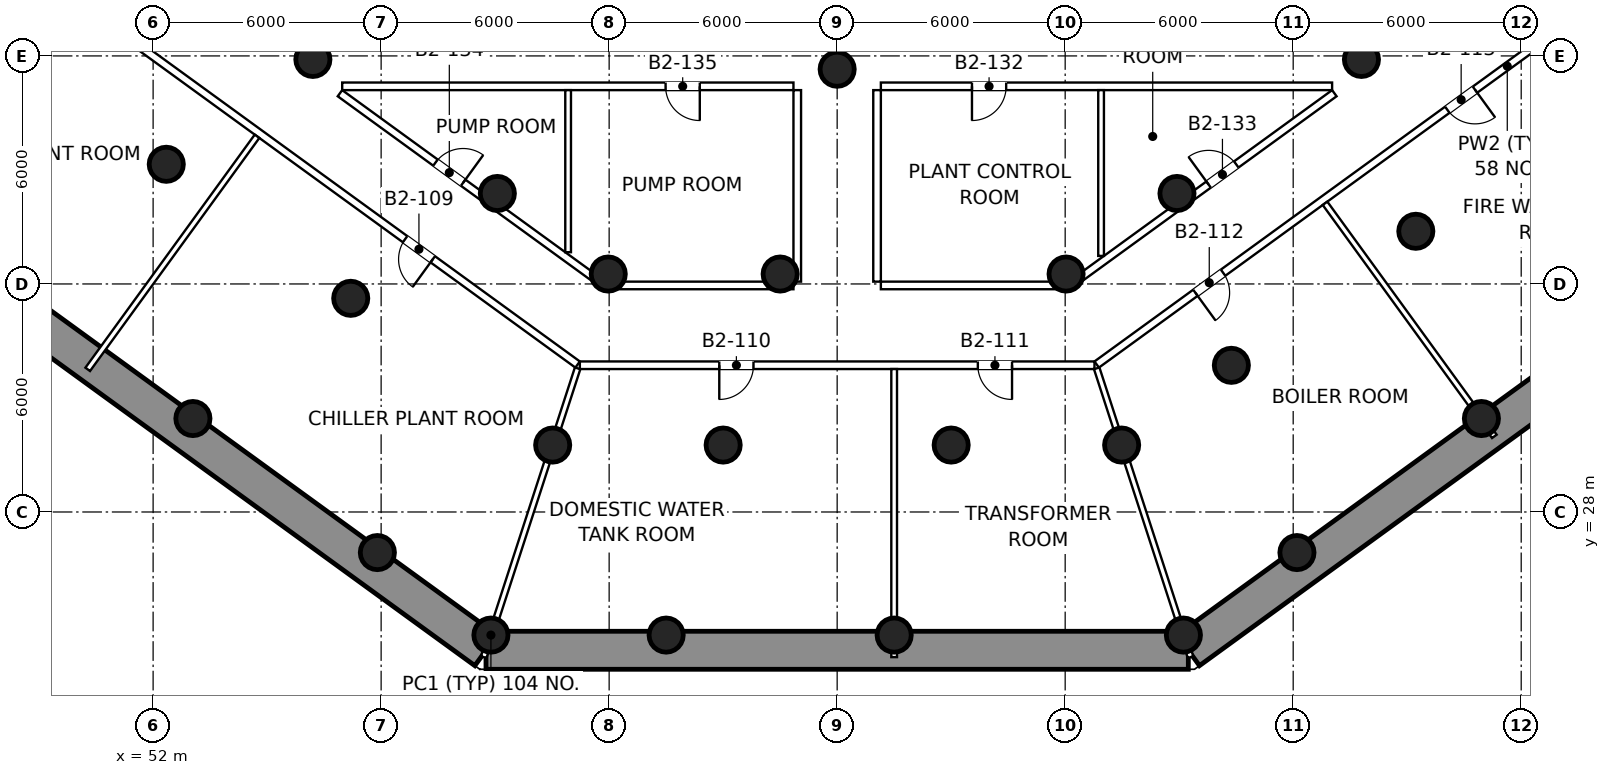
"""IFC4 building model, lengths in metres.
Left out: names, types, materials, properties, quantities, classifications, styles, units other than length and angle.
Written with IfcOpenShell. Run it as: python <this file> out.ifc"""

import sys

from ifc_helpers import new_model, si_unit, direction, frame, frame_2d, origin, origin_2d, place, context, subcontext, project, spatial, rectangle, circle, extrude, element, fill, save


model = new_model("IFC4")
c1 = context("Model", 3, precision=1e-05, world=origin(), true_north=direction((0.0, 1.0)))
c2 = subcontext(c1, "Body", "Model", "MODEL_VIEW")
j1 = project(units=[si_unit("LENGTHUNIT", "METRE"), si_unit("PLANEANGLEUNIT", "RADIAN")], contexts=[c1])
p1 = place(None, origin())
s1 = spatial("IfcSite", under=j1, at=p1, CompositionType="ELEMENT")
p2 = place(p1, origin())
s2 = spatial("IfcBuilding", under=s1, at=p2, CompositionType="ELEMENT")
p3 = place(p2, frame((0.0, 0.0, -10.0)))
s3 = spatial("IfcBuildingStorey", under=s2, at=p3, CompositionType="ELEMENT", Elevation=-10.0)
p4 = place(p3, frame((104.844, 42.963, 0.0), z_axis=(0.0, 0.0, 1.0), x_axis=(-0.809018883304, -0.587782652396, 0.0)))
e1 = element("IfcWall", 1, at=p4, inside=s3, PredefinedType="SOLIDWALL", context=c2, shape_type="SweptSolid", body=[
    extrude(rectangle(XDim=31.647, YDim=1.0, at=frame_2d((15.823, 0.0))), origin(), (0.0, 0.0, 1.0), 4.65),
])
p5 = place(p3, frame((79.24, 24.361, 0.0), z_axis=(0.0, 0.0, 1.0), x_axis=(-1.0, 0.0, 0.0)))
e2 = element("IfcWall", 2, at=p5, inside=s3, PredefinedType="SOLIDWALL", context=c2, shape_type="SweptSolid", body=[
    extrude(rectangle(XDim=18.481, YDim=1.0, at=frame_2d((9.24, 0.0))), origin(), (0.0, 0.0, 1.0), 4.65),
])
p6 = place(p3, frame((60.76, 24.361, 0.0), z_axis=(0.0, 0.0, 1.0), x_axis=(-0.809018883304, 0.587782652396, 0.0)))
e3 = element("IfcWall", 3, at=p6, inside=s3, PredefinedType="SOLIDWALL", context=c2, shape_type="SweptSolid", body=[
    extrude(rectangle(XDim=31.647, YDim=1.0, at=frame_2d((15.823, 0.0))), origin(), (0.0, 0.0, 1.0), 4.65),
])
for number, where, z_axis, x_axis in (
    (4, (70.0, 39.65, 0.0), (0.0, 0.0, 1.0), (1.0, 0.0, 0.0)),
    (5, (53.047, 30.459, 0.0), (0.0, 0.0, 1.0), (1.0, 0.0, 0.0)),
    (6, (57.901, 26.932, 0.0), (0.0, 0.0, 1.0), (1.0, 0.0, 0.0)),
    (7, (60.889, 24.761, 0.0), (0.0, 0.0, 1.0), (1.0, 0.0, 0.0)),
    (8, (65.5, 24.761, 0.0), (0.0, 0.0, 1.0), (1.0, 0.0, 0.0)),
    (9, (71.5, 24.761, 0.0), (0.0, 0.0, 1.0), (1.0, 0.0, 0.0)),
    (10, (79.111, 24.761, 0.0), (0.0, 0.0, 1.0), (1.0, 0.0, 0.0)),
    (11, (82.099, 26.932, 0.0), (0.0, 0.0, 1.0), (1.0, 0.0, 0.0)),
    (12, (86.953, 30.459, 0.0), (0.0, 0.0, 1.0), (1.0, 0.0, 0.0)),
    (13, (52.346, 37.149, 0.0), (0.0, 0.0, 1.0), (1.0, 0.0, 0.0)),
    (14, (57.2, 33.622, 0.0), (0.0, 0.0, 1.0), (1.0, 0.0, 0.0)),
    (15, (62.514, 29.761, 0.0), (0.0, 0.0, 1.0), (1.0, 0.0, 0.0)),
    (16, (67.0, 29.761, 0.0), (0.0, 0.0, 1.0), (1.0, 0.0, 0.0)),
    (17, (73.0, 29.761, 0.0), (0.0, 0.0, 1.0), (1.0, 0.0, 0.0)),
    (18, (77.486, 29.761, 0.0), (0.0, 0.0, 1.0), (1.0, 0.0, 0.0)),
    (19, (80.373, 31.859, 0.0), (0.0, 0.0, 1.0), (1.0, 0.0, 0.0)),
    (20, (85.227, 35.386, 0.0), (0.0, 0.0, 1.0), (1.0, 0.0, 0.0)),
    (21, (56.204, 39.908, 0.0), (0.0, 0.0, 1.0), (1.0, 0.0, 0.0)),
    (22, (61.058, 36.381, 0.0), (0.0, 0.0, 1.0), (1.0, 0.0, 0.0)),
    (23, (63.976, 34.261, 0.0), (0.0, 0.0, 1.0), (1.0, 0.0, 0.0)),
    (24, (68.5, 34.261, 0.0), (0.0, 0.0, 1.0), (1.0, 0.0, 0.0)),
    (25, (76.024, 34.261, 0.0), (0.0, 0.0, 1.0), (1.0, 0.0, 0.0)),
    (26, (78.942, 36.381, 0.0), (0.0, 0.0, 1.0), (1.0, 0.0, 0.0)),
    (27, (83.796, 39.908, 0.0), (0.0, 0.0, 1.0), (1.0, 0.0, 0.0)),
):
    element("IfcColumn", number, at=place(p3, frame(where, z_axis=z_axis, x_axis=x_axis)), inside=s3, PredefinedType="COLUMN", context=c2, shape_type="SweptSolid", body=[
        extrude(circle(Radius=0.45, at=origin_2d()), origin(), (0.0, 0.0, 1.0), 5.0),
    ])
p7 = place(p3, frame((98.437, 47.579, 0.0), z_axis=(0.0, 0.0, 1.0), x_axis=(-0.809016646189, -0.587785731529, 0.0)))
e28 = element("IfcWall", 28, at=p7, inside=s3, PredefinedType="PARTITIONING", context=c2, shape_type="SweptSolid", body=[
    extrude(rectangle(XDim=26.708, YDim=0.2, at=frame_2d((13.354, 0.0))), origin(), (0.0, 0.0, 1.0), 4.65),
])
p8 = place(p7, frame((22.597, 0.0, 0.0)))
e29 = element("IfcOpeningElement", 29, at=p8, cuts=e28, PredefinedType="OPENING", context=c2, shape_type="SweptSolid", body=[
    extrude(rectangle(XDim=0.9, YDim=2.1, at=frame_2d((0.45, 1.05))), frame((0.0, 0.11, 0.0), z_axis=(0.0, -1.0, 0.0), x_axis=(1.0, 0.0, 0.0)), (0.0, 0.0, 1.0), 0.22),
])
p9 = place(p7, frame((14.404, 0.0, 0.0)))
e30 = element("IfcOpeningElement", 30, at=p9, cuts=e28, PredefinedType="OPENING", context=c2, shape_type="SweptSolid", body=[
    extrude(rectangle(XDim=0.9, YDim=2.1, at=frame_2d((0.45, 1.05))), frame((0.0, 0.11, 0.0), z_axis=(0.0, -1.0, 0.0), x_axis=(1.0, 0.0, 0.0)), (0.0, 0.0, 1.0), 0.22),
])
p10 = place(p7, frame((5.404, 0.0, 0.0)))
e31 = element("IfcOpeningElement", 31, at=p10, cuts=e28, PredefinedType="OPENING", context=c2, shape_type="SweptSolid", body=[
    extrude(rectangle(XDim=0.9, YDim=2.1, at=frame_2d((0.45, 1.05))), frame((0.0, 0.11, 0.0), z_axis=(0.0, -1.0, 0.0), x_axis=(1.0, 0.0, 0.0)), (0.0, 0.0, 1.0), 0.22),
])
p11 = place(p7, frame((0.261, 0.0, 0.0)))
e32 = element("IfcOpeningElement", 32, at=p11, cuts=e28, PredefinedType="OPENING", context=c2, shape_type="SweptSolid", body=[
    extrude(rectangle(XDim=0.8, YDim=2.1, at=frame_2d((0.4, 1.05))), frame((0.0, 0.11, 0.0), z_axis=(0.0, -1.0, 0.0), x_axis=(1.0, 0.0, 0.0)), (0.0, 0.0, 1.0), 0.22),
])
p12 = place(p3, frame((76.771, 31.861, 0.0), z_axis=(0.0, 0.0, 1.0), x_axis=(-1.0, 0.0, 0.0)))
e33 = element("IfcWall", 33, at=p12, inside=s3, PredefinedType="PARTITIONING", context=c2, shape_type="SweptSolid", body=[
    extrude(rectangle(XDim=13.542, YDim=0.2, at=frame_2d((6.771, 0.0))), origin(), (0.0, 0.0, 1.0), 4.65),
])
p13 = place(p12, frame((8.973, 0.0, 0.0)))
e34 = element("IfcOpeningElement", 34, at=p13, cuts=e33, PredefinedType="OPENING", context=c2, shape_type="SweptSolid", body=[
    extrude(rectangle(XDim=0.9, YDim=2.1, at=frame_2d((0.45, 1.05))), frame((0.0, 0.11, 0.0), z_axis=(0.0, -1.0, 0.0), x_axis=(1.0, 0.0, 0.0)), (0.0, 0.0, 1.0), 0.22),
])
p14 = place(p12, frame((2.169, 0.0, 0.0)))
e35 = element("IfcOpeningElement", 35, at=p14, cuts=e33, PredefinedType="OPENING", context=c2, shape_type="SweptSolid", body=[
    extrude(rectangle(XDim=0.9, YDim=2.1, at=frame_2d((0.45, 1.05))), frame((0.0, 0.11, 0.0), z_axis=(0.0, -1.0, 0.0), x_axis=(1.0, 0.0, 0.0)), (0.0, 0.0, 1.0), 0.22),
])
p15 = place(p3, frame((63.17, 31.88, 0.0), z_axis=(0.0, 0.0, 1.0), x_axis=(-0.809016646189, 0.587785731529, 0.0)))
e36 = element("IfcWall", 36, at=p15, inside=s3, PredefinedType="PARTITIONING", context=c2, shape_type="SweptSolid", body=[
    extrude(rectangle(XDim=26.708, YDim=0.2, at=frame_2d((13.354, 0.0))), origin(), (0.0, 0.0, 1.0), 4.65),
])
p16 = place(p15, frame((24.097, 0.0, 0.0)))
e37 = element("IfcOpeningElement", 37, at=p16, cuts=e36, PredefinedType="OPENING", context=c2, shape_type="SweptSolid", body=[
    extrude(rectangle(XDim=0.9, YDim=2.1, at=frame_2d((0.45, 1.05))), frame((0.0, 0.11, 0.0), z_axis=(0.0, -1.0, 0.0), x_axis=(1.0, 0.0, 0.0)), (0.0, 0.0, 1.0), 0.22),
])
p17 = place(p15, frame((15.904, 0.0, 0.0)))
e38 = element("IfcOpeningElement", 38, at=p17, cuts=e36, PredefinedType="OPENING", context=c2, shape_type="SweptSolid", body=[
    extrude(rectangle(XDim=0.9, YDim=2.1, at=frame_2d((0.45, 1.05))), frame((0.0, 0.11, 0.0), z_axis=(0.0, -1.0, 0.0), x_axis=(1.0, 0.0, 0.0)), (0.0, 0.0, 1.0), 0.22),
])
p18 = place(p15, frame((4.711, 0.0, 0.0)))
e39 = element("IfcOpeningElement", 39, at=p18, cuts=e36, PredefinedType="OPENING", context=c2, shape_type="SweptSolid", body=[
    extrude(rectangle(XDim=0.9, YDim=2.1, at=frame_2d((0.45, 1.05))), frame((0.0, 0.11, 0.0), z_axis=(0.0, -1.0, 0.0), x_axis=(1.0, 0.0, 0.0)), (0.0, 0.0, 1.0), 0.22),
])
p19 = place(p3, frame((76.148, 33.98, 0.0), z_axis=(0.0, 0.0, 1.0), x_axis=(0.809015553327, 0.58778723572, 0.0)))
e40 = element("IfcWall", 40, at=p19, inside=s3, PredefinedType="PARTITIONING", context=c2, shape_type="SweptSolid", body=[
    extrude(rectangle(XDim=8.573, YDim=0.2, at=frame_2d((4.286, 0.0))), origin(), (0.0, 0.0, 1.0), 3.95),
])
p20 = place(p19, frame((4.483, 0.0, 0.0)))
e41 = element("IfcOpeningElement", 41, at=p20, cuts=e40, PredefinedType="OPENING", context=c2, shape_type="SweptSolid", body=[
    extrude(rectangle(XDim=0.9, YDim=2.1, at=frame_2d((0.45, 1.05))), frame((0.0, 0.11, 0.0), z_axis=(0.0, -1.0, 0.0), x_axis=(1.0, 0.0, 0.0)), (0.0, 0.0, 1.0), 0.22),
])
p21 = place(p3, frame((83.024, 39.2, 0.0), z_axis=(0.0, 0.0, 1.0), x_axis=(-1.0, 0.0, 0.0)))
e42 = element("IfcWall", 42, at=p21, inside=s3, PredefinedType="PARTITIONING", context=c2, shape_type="SweptSolid", body=[
    extrude(rectangle(XDim=11.875, YDim=0.2, at=frame_2d((5.937, 0.0))), origin(), (0.0, 0.0, 1.0), 3.95),
])
p22 = place(p21, frame((8.577, 0.0, 0.0)))
e43 = element("IfcOpeningElement", 43, at=p22, cuts=e42, PredefinedType="OPENING", context=c2, shape_type="SweptSolid", body=[
    extrude(rectangle(XDim=0.9, YDim=2.1, at=frame_2d((0.45, 1.05))), frame((0.0, 0.11, 0.0), z_axis=(0.0, -1.0, 0.0), x_axis=(1.0, 0.0, 0.0)), (0.0, 0.0, 1.0), 0.22),
])
p23 = place(p3, frame((71.05, 39.1, 0.0), z_axis=(0.0, 0.0, 1.0), x_axis=(0.0, -1.0, 0.0)))
e44 = element("IfcWall", 44, at=p23, inside=s3, PredefinedType="PARTITIONING", context=c2, shape_type="SweptSolid", body=[
    extrude(rectangle(XDim=5.039, YDim=0.2, at=frame_2d((2.52, 0.0))), origin(), (0.0, 0.0, 1.0), 3.95),
])
p24 = place(p3, frame((71.15, 33.961, 0.0), z_axis=(0.0, 0.0, 1.0), x_axis=(1.0, 0.0, 0.0)))
e45 = element("IfcWall", 45, at=p24, inside=s3, PredefinedType="PARTITIONING", context=c2, shape_type="SweptSolid", body=[
    extrude(rectangle(XDim=4.939, YDim=0.2, at=frame_2d((2.469, 0.0))), origin(), (0.0, 0.0, 1.0), 3.95),
])
p25 = place(p3, frame((68.95, 34.061, 0.0), z_axis=(0.0, 0.0, 1.0), x_axis=(0.0, 1.0, 0.0)))
e46 = element("IfcWall", 46, at=p25, inside=s3, PredefinedType="PARTITIONING", context=c2, shape_type="SweptSolid", body=[
    extrude(rectangle(XDim=5.039, YDim=0.2, at=frame_2d((2.52, 0.0))), origin(), (0.0, 0.0, 1.0), 3.95),
])
p26 = place(p3, frame((68.85, 39.2, 0.0), z_axis=(0.0, 0.0, 1.0), x_axis=(-1.0, 0.0, 0.0)))
e47 = element("IfcWall", 47, at=p26, inside=s3, PredefinedType="PARTITIONING", context=c2, shape_type="SweptSolid", body=[
    extrude(rectangle(XDim=11.875, YDim=0.2, at=frame_2d((5.937, 0.0))), origin(), (0.0, 0.0, 1.0), 3.95),
])
p27 = place(p26, frame((2.465, 0.0, 0.0)))
e48 = element("IfcOpeningElement", 48, at=p27, cuts=e47, PredefinedType="OPENING", context=c2, shape_type="SweptSolid", body=[
    extrude(rectangle(XDim=0.9, YDim=2.1, at=frame_2d((0.45, 1.05))), frame((0.0, 0.11, 0.0), z_axis=(0.0, -1.0, 0.0), x_axis=(1.0, 0.0, 0.0)), (0.0, 0.0, 1.0), 0.22),
])
p28 = place(p3, frame((56.917, 39.019, 0.0), z_axis=(0.0, 0.0, 1.0), x_axis=(0.809015553327, -0.58778723572, 0.0)))
e49 = element("IfcWall", 49, at=p28, inside=s3, PredefinedType="PARTITIONING", context=c2, shape_type="SweptSolid", body=[
    extrude(rectangle(XDim=8.573, YDim=0.2, at=frame_2d((4.286, 0.0))), origin(), (0.0, 0.0, 1.0), 3.95),
])
p29 = place(p28, frame((3.107, 0.0, 0.0)))
e50 = element("IfcOpeningElement", 50, at=p29, cuts=e49, PredefinedType="OPENING", context=c2, shape_type="SweptSolid", body=[
    extrude(rectangle(XDim=0.9, YDim=2.1, at=frame_2d((0.45, 1.05))), frame((0.0, 0.11, 0.0), z_axis=(0.0, -1.0, 0.0), x_axis=(1.0, 0.0, 0.0)), (0.0, 0.0, 1.0), 0.22),
])
p30 = place(p3, frame((63.911, 33.961, 0.0), z_axis=(0.0, 0.0, 1.0), x_axis=(1.0, 0.0, 0.0)))
e51 = element("IfcWall", 51, at=p30, inside=s3, PredefinedType="PARTITIONING", context=c2, shape_type="SweptSolid", body=[
    extrude(rectangle(XDim=4.939, YDim=0.2, at=frame_2d((2.469, 0.0))), origin(), (0.0, 0.0, 1.0), 3.95),
])
for number, where, z_axis, x_axis in (
    (52, (60.701, 24.181, 0.0), (0.0, 0.0, 1.0), (0.309, 0.951, 0.0)),
    (53, (79.299, 24.181, 0.0), (0.0, 0.0, 1.0), (-0.309, 0.951, 0.0)),
):
    element("IfcWall", number, at=place(p3, frame(where, z_axis=z_axis, x_axis=x_axis)), inside=s3, PredefinedType="PARTITIONING", context=c2, shape_type="SweptSolid", body=[
        extrude(rectangle(XDim=7.99, YDim=0.15, at=frame_2d((3.995, 0.0))), origin(), (0.0, 0.0, 1.0), 4.65),
    ])
for number, where, z_axis, x_axis in (
    (54, (50.279, 31.753, 0.0), (0.0, 0.0, 1.0), (0.588, 0.809, 0.0)),
    (55, (71.5, 24.181, 0.0), (0.0, 0.0, 1.0), (0.0, 1.0, 0.0)),
):
    element("IfcWall", number, at=place(p3, frame(where, z_axis=z_axis, x_axis=x_axis)), inside=s3, PredefinedType="PARTITIONING", context=c2, shape_type="SweptSolid", body=[
        extrude(rectangle(XDim=7.58, YDim=0.15, at=frame_2d((3.79, 0.0))), origin(), (0.0, 0.0, 1.0), 3.95),
    ])
p31 = place(p3, frame((87.294, 29.99, 0.0), z_axis=(0.0, 0.0, 1.0), x_axis=(-0.587800109381, 0.80900619986, 0.0)))
e56 = element("IfcWall", 56, at=p31, inside=s3, PredefinedType="PARTITIONING", context=c2, shape_type="SweptSolid", body=[
    extrude(rectangle(XDim=7.58, YDim=0.15, at=frame_2d((3.79, 0.0))), origin(), (0.0, 0.0, 1.0), 3.95),
])
p32 = place(p3, frame((76.945, 34.738, 0.0), z_axis=(0.0, 0.0, 1.0), x_axis=(0.0, 1.0, 0.0)))
e57 = element("IfcWall", 57, at=p32, inside=s3, PredefinedType="PARTITIONING", context=c2, shape_type="SweptSolid", body=[
    extrude(rectangle(XDim=4.362, YDim=0.15, at=frame_2d((2.181, 0.0))), origin(), (0.0, 0.0, 1.0), 3.95),
])
p33 = place(p3, frame((62.921, 34.835, 0.0), z_axis=(0.0, 0.0, 1.0), x_axis=(0.0, 1.0, 0.0)))
e58 = element("IfcWall", 58, at=p33, inside=s3, PredefinedType="PARTITIONING", context=c2, shape_type="SweptSolid", body=[
    extrude(rectangle(XDim=4.265, YDim=0.15, at=frame_2d((2.132, 0.0))), origin(), (0.0, 0.0, 1.0), 3.95),
])
p34 = place(p18, origin())
e59 = element("IfcDoor", 59, at=p34, inside=s3, OperationType="SINGLE_SWING_LEFT", PredefinedType="DOOR", context=c2, shape_type="SweptSolid", body=[
    extrude(rectangle(XDim=0.9, YDim=2.1, at=frame_2d((0.45, 1.05))), frame((0.0, 0.025, 0.0), z_axis=(0.0, -1.0, 0.0), x_axis=(1.0, 0.0, 0.0)), (0.0, 0.0, 1.0), 0.05),
])
fill(e39, e59)
p35 = place(p13, origin())
e60 = element("IfcDoor", 60, at=p35, inside=s3, OperationType="SINGLE_SWING_RIGHT", PredefinedType="DOOR", context=c2, shape_type="SweptSolid", body=[
    extrude(rectangle(XDim=0.9, YDim=2.1, at=frame_2d((0.45, 1.05))), frame((0.0, 0.025, 0.0), z_axis=(0.0, -1.0, 0.0), x_axis=(1.0, 0.0, 0.0)), (0.0, 0.0, 1.0), 0.05),
])
fill(e34, e60)
p36 = place(p14, origin())
e61 = element("IfcDoor", 61, at=p36, inside=s3, OperationType="SINGLE_SWING_LEFT", PredefinedType="DOOR", context=c2, shape_type="SweptSolid", body=[
    extrude(rectangle(XDim=0.9, YDim=2.1, at=frame_2d((0.45, 1.05))), frame((0.0, 0.025, 0.0), z_axis=(0.0, -1.0, 0.0), x_axis=(1.0, 0.0, 0.0)), (0.0, 0.0, 1.0), 0.05),
])
fill(e35, e61)
p37 = place(p8, origin())
e62 = element("IfcDoor", 62, at=p37, inside=s3, OperationType="SINGLE_SWING_RIGHT", PredefinedType="DOOR", context=c2, shape_type="SweptSolid", body=[
    extrude(rectangle(XDim=0.9, YDim=2.1, at=frame_2d((0.45, 1.05))), frame((0.0, 0.025, 0.0), z_axis=(0.0, -1.0, 0.0), x_axis=(1.0, 0.0, 0.0)), (0.0, 0.0, 1.0), 0.05),
])
fill(e29, e62)
p38 = place(p9, origin())
e63 = element("IfcDoor", 63, at=p38, inside=s3, OperationType="SINGLE_SWING_LEFT", PredefinedType="DOOR", context=c2, shape_type="SweptSolid", body=[
    extrude(rectangle(XDim=0.9, YDim=2.1, at=frame_2d((0.45, 1.05))), frame((0.0, 0.025, 0.0), z_axis=(0.0, -1.0, 0.0), x_axis=(1.0, 0.0, 0.0)), (0.0, 0.0, 1.0), 0.05),
])
fill(e30, e63)
p39 = place(p22, origin())
e64 = element("IfcDoor", 64, at=p39, inside=s3, OperationType="SINGLE_SWING_RIGHT", PredefinedType="DOOR", context=c2, shape_type="SweptSolid", body=[
    extrude(rectangle(XDim=0.9, YDim=2.1, at=frame_2d((0.45, 1.05))), frame((0.0, 0.025, 0.0), z_axis=(0.0, -1.0, 0.0), x_axis=(1.0, 0.0, 0.0)), (0.0, 0.0, 1.0), 0.05),
])
fill(e43, e64)
p40 = place(p20, origin())
e65 = element("IfcDoor", 65, at=p40, inside=s3, OperationType="SINGLE_SWING_LEFT", PredefinedType="DOOR", context=c2, shape_type="SweptSolid", body=[
    extrude(rectangle(XDim=0.9, YDim=2.1, at=frame_2d((0.45, 1.05))), frame((0.0, 0.025, 0.0), z_axis=(0.0, -1.0, 0.0), x_axis=(1.0, 0.0, 0.0)), (0.0, 0.0, 1.0), 0.05),
])
fill(e41, e65)
p41 = place(p29, origin())
e66 = element("IfcDoor", 66, at=p41, inside=s3, OperationType="SINGLE_SWING_RIGHT", PredefinedType="DOOR", context=c2, shape_type="SweptSolid", body=[
    extrude(rectangle(XDim=0.9, YDim=2.1, at=frame_2d((0.45, 1.05))), frame((0.0, 0.025, 0.0), z_axis=(0.0, -1.0, 0.0), x_axis=(1.0, 0.0, 0.0)), (0.0, 0.0, 1.0), 0.05),
])
fill(e50, e66)
p42 = place(p27, origin())
e67 = element("IfcDoor", 67, at=p42, inside=s3, OperationType="SINGLE_SWING_LEFT", PredefinedType="DOOR", context=c2, shape_type="SweptSolid", body=[
    extrude(rectangle(XDim=0.9, YDim=2.1, at=frame_2d((0.45, 1.05))), frame((0.0, 0.025, 0.0), z_axis=(0.0, -1.0, 0.0), x_axis=(1.0, 0.0, 0.0)), (0.0, 0.0, 1.0), 0.05),
])
fill(e48, e67)
save(model, sys.argv[1])
